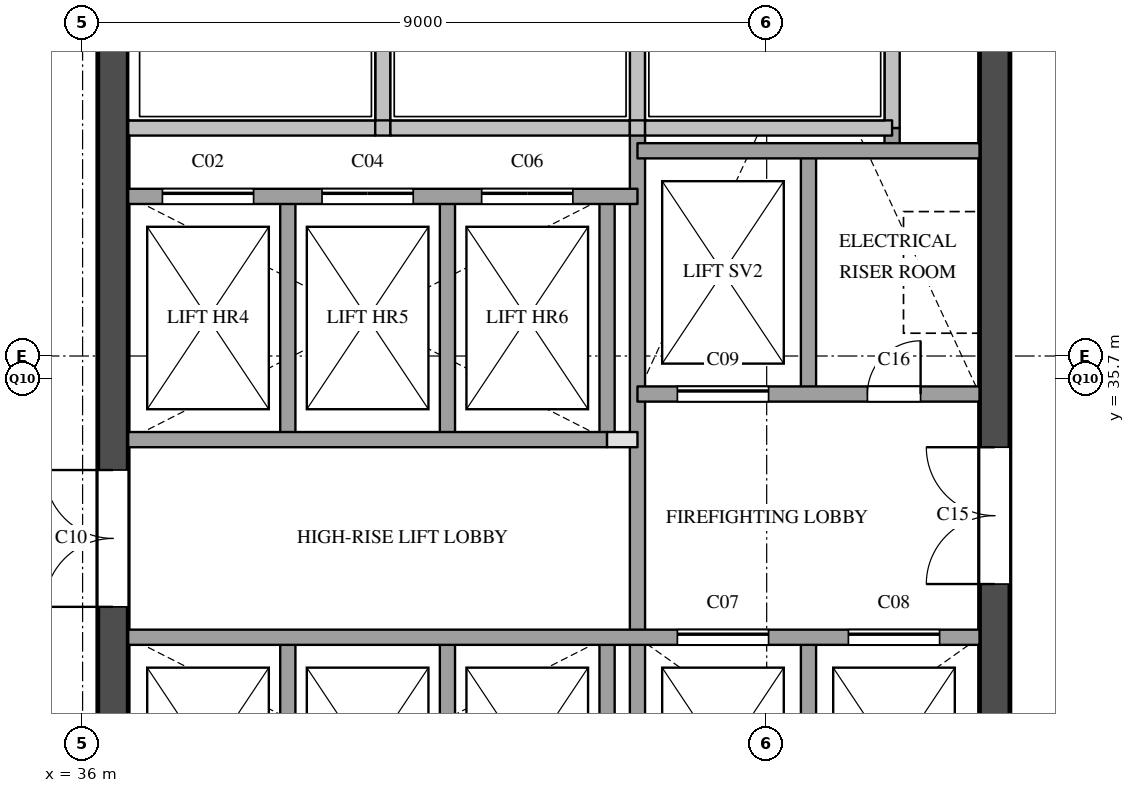
"""IFC4 building model, lengths in metres.
Left out: names, types, materials, properties, quantities, classifications, styles, units other than length and angle.
Written with IfcOpenShell. Run it as: python <this file> out.ifc"""

import sys

from ifc_helpers import new_model, si_unit, direction, frame, frame_2d, origin, place, context, subcontext, project, spatial, rectangle, extrude, element, fill, save


model = new_model("IFC4")
c1 = context("Model", 3, precision=1e-05, world=origin(), true_north=direction((0.0, 1.0)))
c2 = subcontext(c1, "Body", "Model", "MODEL_VIEW")
j1 = project(units=[si_unit("LENGTHUNIT", "METRE"), si_unit("PLANEANGLEUNIT", "RADIAN")], contexts=[c1])
p1 = place(None, origin())
s1 = spatial("IfcSite", under=j1, at=p1, CompositionType="ELEMENT")
p2 = place(p1, origin())
s2 = spatial("IfcBuilding", under=s1, at=p2, CompositionType="ELEMENT")
p3 = place(p2, frame((0.0, 0.0, 218.9)))
s3 = spatial("IfcBuildingStorey", under=s2, at=p3, CompositionType="ELEMENT", Elevation=218.9)
p4 = place(p3, frame((36.4, 29.1, 0.0), z_axis=(0.0, 0.0, 1.0), x_axis=(0.0, 1.0, 0.0)))
e1 = element("IfcWall", 1, at=p4, inside=s3, PredefinedType="SHEAR", context=c2, shape_type="SweptSolid", body=[
    extrude(rectangle(XDim=20.3, YDim=0.4, at=frame_2d((10.15, 0.0))), origin(), (0.0, 0.0, 1.0), 3.6),
])
p5 = place(p4, frame((3.6, 0.0, 0.0)))
e2 = element("IfcOpeningElement", 2, at=p5, cuts=e1, PredefinedType="OPENING", context=c2, shape_type="SweptSolid", body=[
    extrude(rectangle(XDim=1.8, YDim=2.1, at=frame_2d((0.9, 1.05))), frame((0.0, 0.21, 0.0), z_axis=(0.0, -1.0, 0.0), x_axis=(1.0, 0.0, 0.0)), (0.0, 0.0, 1.0), 0.42),
])
p6 = place(p4, frame((16.4, 0.0, 0.0)))
e3 = element("IfcOpeningElement", 3, at=p6, cuts=e1, PredefinedType="OPENING", context=c2, shape_type="SweptSolid", body=[
    extrude(rectangle(XDim=1.0, YDim=2.1, at=frame_2d((0.5, 1.05))), frame((0.0, 0.21, 0.0), z_axis=(0.0, -1.0, 0.0), x_axis=(1.0, 0.0, 0.0)), (0.0, 0.0, 1.0), 0.42),
])
p7 = place(p3, frame((48.0, 29.1, 0.0), z_axis=(0.0, 0.0, 1.0), x_axis=(0.0, 1.0, 0.0)))
e4 = element("IfcWall", 4, at=p7, inside=s3, PredefinedType="SHEAR", context=c2, shape_type="SweptSolid", body=[
    extrude(rectangle(XDim=20.3, YDim=0.4, at=frame_2d((10.15, 0.0))), origin(), (0.0, 0.0, 1.0), 3.6),
])
p8 = place(p7, frame((12.5, 0.0, 0.0)))
e5 = element("IfcOpeningElement", 5, at=p8, cuts=e4, PredefinedType="OPENING", context=c2, shape_type="SweptSolid", body=[
    extrude(rectangle(XDim=0.7, YDim=2.1, at=frame_2d((0.35, 1.05))), frame((0.0, 0.21, 0.0), z_axis=(0.0, -1.0, 0.0), x_axis=(1.0, 0.0, 0.0)), (0.0, 0.0, 1.0), 0.42),
])
p9 = place(p7, frame((3.9, 0.0, 0.0)))
e6 = element("IfcOpeningElement", 6, at=p9, cuts=e4, PredefinedType="OPENING", context=c2, shape_type="SweptSolid", body=[
    extrude(rectangle(XDim=1.8, YDim=2.1, at=frame_2d((0.9, 1.05))), frame((0.0, 0.21, 0.0), z_axis=(0.0, -1.0, 0.0), x_axis=(1.0, 0.0, 0.0)), (0.0, 0.0, 1.0), 0.42),
])
p10 = place(p3, frame((38.7, 29.1, 0.0), z_axis=(0.0, 0.0, 1.0), x_axis=(0.0, 1.0, 0.0)))
e7 = element("IfcWall", 7, at=p10, inside=s3, PredefinedType="SOLIDWALL", context=c2, shape_type="SweptSolid", body=[
    extrude(rectangle(XDim=3.2, YDim=0.2, at=frame_2d((1.6, 0.0))), origin(), (0.0, 0.0, 1.0), 3.6),
])
p11 = place(p3, frame((38.7, 34.9, 0.0), z_axis=(0.0, 0.0, 1.0), x_axis=(0.0, 1.0, 0.0)))
e8 = element("IfcWall", 8, at=p11, inside=s3, PredefinedType="SOLIDWALL", context=c2, shape_type="SweptSolid", body=[
    extrude(rectangle(XDim=3.2, YDim=0.2, at=frame_2d((1.6, 0.0))), origin(), (0.0, 0.0, 1.0), 3.6),
])
p12 = place(p3, frame((39.95, 39.0, 0.0), z_axis=(0.0, 0.0, 1.0), x_axis=(0.0, 1.0, 0.0)))
e9 = element("IfcWall", 9, at=p12, inside=s3, PredefinedType="SOLIDWALL", context=c2, shape_type="SweptSolid", body=[
    extrude(rectangle(XDim=1.78, YDim=0.2, at=frame_2d((0.89, 0.0))), origin(), (0.0, 0.0, 1.0), 3.6),
])
p13 = place(p3, frame((40.8, 29.1, 0.0), z_axis=(0.0, 0.0, 1.0), x_axis=(0.0, 1.0, 0.0)))
e10 = element("IfcWall", 10, at=p13, inside=s3, PredefinedType="SOLIDWALL", context=c2, shape_type="SweptSolid", body=[
    extrude(rectangle(XDim=3.2, YDim=0.2, at=frame_2d((1.6, 0.0))), origin(), (0.0, 0.0, 1.0), 3.6),
])
p14 = place(p3, frame((40.8, 34.9, 0.0), z_axis=(0.0, 0.0, 1.0), x_axis=(0.0, 1.0, 0.0)))
e11 = element("IfcWall", 11, at=p14, inside=s3, PredefinedType="SOLIDWALL", context=c2, shape_type="SweptSolid", body=[
    extrude(rectangle(XDim=3.2, YDim=0.2, at=frame_2d((1.6, 0.0))), origin(), (0.0, 0.0, 1.0), 3.6),
])
p15 = place(p3, frame((42.9, 29.1, 0.0), z_axis=(0.0, 0.0, 1.0), x_axis=(0.0, 1.0, 0.0)))
e12 = element("IfcWall", 12, at=p15, inside=s3, PredefinedType="SOLIDWALL", context=c2, shape_type="SweptSolid", body=[
    extrude(rectangle(XDim=3.2, YDim=0.2, at=frame_2d((1.6, 0.0))), origin(), (0.0, 0.0, 1.0), 3.6),
])
p16 = place(p3, frame((42.9, 34.9, 0.0), z_axis=(0.0, 0.0, 1.0), x_axis=(0.0, 1.0, 0.0)))
e13 = element("IfcWall", 13, at=p16, inside=s3, PredefinedType="SOLIDWALL", context=c2, shape_type="SweptSolid", body=[
    extrude(rectangle(XDim=3.2, YDim=0.2, at=frame_2d((1.6, 0.0))), origin(), (0.0, 0.0, 1.0), 3.6),
])
p17 = place(p3, frame((43.3, 29.1, 0.0), z_axis=(0.0, 0.0, 1.0), x_axis=(0.0, 1.0, 0.0)))
e14 = element("IfcWall", 14, at=p17, inside=s3, PredefinedType="SOLIDWALL", context=c2, shape_type="SweptSolid", body=[
    extrude(rectangle(XDim=9.9, YDim=0.2, at=frame_2d((4.95, 0.0))), origin(), (0.0, 0.0, 1.0), 3.6),
])
p18 = place(p3, frame((43.3, 39.0, 0.0), z_axis=(0.0, 0.0, 1.0), x_axis=(0.0, 1.0, 0.0)))
e15 = element("IfcWall", 15, at=p18, inside=s3, PredefinedType="SOLIDWALL", context=c2, shape_type="SweptSolid", body=[
    extrude(rectangle(XDim=1.78, YDim=0.2, at=frame_2d((0.89, 0.0))), origin(), (0.0, 0.0, 1.0), 3.6),
])
for number, where, z_axis, x_axis in (
    (16, (45.55, 29.1, 0.0), (0.0, 0.0, 1.0), (0.0, 1.0, 0.0)),
    (17, (45.55, 35.5, 0.0), (0.0, 0.0, 1.0), (0.0, 1.0, 0.0)),
):
    element("IfcWall", number, at=place(p3, frame(where, z_axis=z_axis, x_axis=x_axis)), inside=s3, PredefinedType="SOLIDWALL", context=c2, shape_type="SweptSolid", body=[
        extrude(rectangle(XDim=3.2, YDim=0.2, at=frame_2d((1.6, 0.0))), origin(), (0.0, 0.0, 1.0), 3.6),
    ])
p19 = place(p3, frame((46.65, 38.7, 0.0), z_axis=(0.0, 0.0, 1.0), x_axis=(0.0, 1.0, 0.0)))
e18 = element("IfcWall", 18, at=p19, inside=s3, PredefinedType="SOLIDWALL", context=c2, shape_type="SweptSolid", body=[
    extrude(rectangle(XDim=0.3, YDim=0.2, at=frame_2d((0.15, 0.0))), origin(), (0.0, 0.0, 1.0), 3.6),
])
p20 = place(p3, frame((46.65, 39.0, 0.0), z_axis=(0.0, 0.0, 1.0), x_axis=(0.0, 1.0, 0.0)))
e19 = element("IfcWall", 19, at=p20, inside=s3, PredefinedType="SOLIDWALL", context=c2, shape_type="SweptSolid", body=[
    extrude(rectangle(XDim=1.78, YDim=0.2, at=frame_2d((0.89, 0.0))), origin(), (0.0, 0.0, 1.0), 3.6),
])
p21 = place(p3, frame((36.6, 32.3, 0.0), z_axis=(0.0, 0.0, 1.0), x_axis=(1.0, 0.0, 0.0)))
e20 = element("IfcWall", 20, at=p21, inside=s3, PredefinedType="SOLIDWALL", context=c2, shape_type="SweptSolid", body=[
    extrude(rectangle(XDim=11.2, YDim=0.2, at=frame_2d((5.6, 0.0))), origin(), (0.0, 0.0, 1.0), 3.6),
])
p22 = place(p21, frame((7.225, 0.0, 0.0)))
e21 = element("IfcOpeningElement", 21, at=p22, cuts=e20, PredefinedType="OPENING", context=c2, shape_type="SweptSolid", body=[
    extrude(rectangle(XDim=1.2, YDim=2.1, at=frame_2d((0.6, 1.05))), frame((0.0, 0.11, 0.0), z_axis=(0.0, -1.0, 0.0), x_axis=(1.0, 0.0, 0.0)), (0.0, 0.0, 1.0), 0.22),
])
p23 = place(p21, frame((9.475, 0.0, 0.0)))
e22 = element("IfcOpeningElement", 22, at=p23, cuts=e20, PredefinedType="OPENING", context=c2, shape_type="SweptSolid", body=[
    extrude(rectangle(XDim=1.2, YDim=2.1, at=frame_2d((0.6, 1.05))), frame((0.0, 0.11, 0.0), z_axis=(0.0, -1.0, 0.0), x_axis=(1.0, 0.0, 0.0)), (0.0, 0.0, 1.0), 0.22),
])
p24 = place(p3, frame((42.9, 34.9, 0.0), z_axis=(0.0, 0.0, 1.0), x_axis=(1.0, 0.0, 0.0)))
e23 = element("IfcWall", 23, at=p24, inside=s3, PredefinedType="PARTITIONING", context=c2, shape_type="SweptSolid", body=[
    extrude(rectangle(XDim=0.4, YDim=0.2, at=frame_2d((0.2, 0.0))), origin(), (0.0, 0.0, 1.0), 3.6),
])
p25 = place(p3, frame((36.6, 34.9, 0.0), z_axis=(0.0, 0.0, 1.0), x_axis=(1.0, 0.0, 0.0)))
e24 = element("IfcWall", 24, at=p25, inside=s3, PredefinedType="SOLIDWALL", context=c2, shape_type="SweptSolid", body=[
    extrude(rectangle(XDim=6.3, YDim=0.2, at=frame_2d((3.15, 0.0))), origin(), (0.0, 0.0, 1.0), 3.6),
])
p26 = place(p3, frame((43.3, 35.5, 0.0), z_axis=(0.0, 0.0, 1.0), x_axis=(1.0, 0.0, 0.0)))
e25 = element("IfcWall", 25, at=p26, inside=s3, PredefinedType="SOLIDWALL", context=c2, shape_type="SweptSolid", body=[
    extrude(rectangle(XDim=4.5, YDim=0.2, at=frame_2d((2.25, 0.0))), origin(), (0.0, 0.0, 1.0), 3.6),
])
p27 = place(p26, frame((0.525, 0.0, 0.0)))
e26 = element("IfcOpeningElement", 26, at=p27, cuts=e25, PredefinedType="OPENING", context=c2, shape_type="SweptSolid", body=[
    extrude(rectangle(XDim=1.2, YDim=2.1, at=frame_2d((0.6, 1.05))), frame((0.0, 0.11, 0.0), z_axis=(0.0, -1.0, 0.0), x_axis=(1.0, 0.0, 0.0)), (0.0, 0.0, 1.0), 0.22),
])
p28 = place(p26, frame((3.025, 0.0, 0.0)))
e27 = element("IfcOpeningElement", 27, at=p28, cuts=e25, PredefinedType="OPENING", context=c2, shape_type="SweptSolid", body=[
    extrude(rectangle(XDim=0.7, YDim=2.1, at=frame_2d((0.35, 1.05))), frame((0.0, 0.11, 0.0), z_axis=(0.0, -1.0, 0.0), x_axis=(1.0, 0.0, 0.0)), (0.0, 0.0, 1.0), 0.22),
])
p29 = place(p3, frame((36.6, 38.1, 0.0), z_axis=(0.0, 0.0, 1.0), x_axis=(1.0, 0.0, 0.0)))
e28 = element("IfcWall", 28, at=p29, inside=s3, PredefinedType="SOLIDWALL", context=c2, shape_type="SweptSolid", body=[
    extrude(rectangle(XDim=6.7, YDim=0.2, at=frame_2d((3.35, 0.0))), origin(), (0.0, 0.0, 1.0), 3.6),
])
p30 = place(p29, frame((0.45, 0.0, 0.0)))
e29 = element("IfcOpeningElement", 29, at=p30, cuts=e28, PredefinedType="OPENING", context=c2, shape_type="SweptSolid", body=[
    extrude(rectangle(XDim=1.2, YDim=2.1, at=frame_2d((0.6, 1.05))), frame((0.0, 0.11, 0.0), z_axis=(0.0, -1.0, 0.0), x_axis=(1.0, 0.0, 0.0)), (0.0, 0.0, 1.0), 0.22),
])
p31 = place(p29, frame((2.55, 0.0, 0.0)))
e30 = element("IfcOpeningElement", 30, at=p31, cuts=e28, PredefinedType="OPENING", context=c2, shape_type="SweptSolid", body=[
    extrude(rectangle(XDim=1.2, YDim=2.1, at=frame_2d((0.6, 1.05))), frame((0.0, 0.11, 0.0), z_axis=(0.0, -1.0, 0.0), x_axis=(1.0, 0.0, 0.0)), (0.0, 0.0, 1.0), 0.22),
])
p32 = place(p29, frame((4.65, 0.0, 0.0)))
e31 = element("IfcOpeningElement", 31, at=p32, cuts=e28, PredefinedType="OPENING", context=c2, shape_type="SweptSolid", body=[
    extrude(rectangle(XDim=1.2, YDim=2.1, at=frame_2d((0.6, 1.05))), frame((0.0, 0.11, 0.0), z_axis=(0.0, -1.0, 0.0), x_axis=(1.0, 0.0, 0.0)), (0.0, 0.0, 1.0), 0.22),
])
p33 = place(p3, frame((43.3, 38.7, 0.0), z_axis=(0.0, 0.0, 1.0), x_axis=(1.0, 0.0, 0.0)))
e32 = element("IfcWall", 32, at=p33, inside=s3, PredefinedType="SOLIDWALL", context=c2, shape_type="SweptSolid", body=[
    extrude(rectangle(XDim=4.5, YDim=0.2, at=frame_2d((2.25, 0.0))), origin(), (0.0, 0.0, 1.0), 3.6),
])
p34 = place(p3, frame((36.6, 39.0, 0.0), z_axis=(0.0, 0.0, 1.0), x_axis=(1.0, 0.0, 0.0)))
e33 = element("IfcWall", 33, at=p34, inside=s3, PredefinedType="SOLIDWALL", context=c2, shape_type="SweptSolid", body=[
    extrude(rectangle(XDim=3.25, YDim=0.2, at=frame_2d((1.625, 0.0))), origin(), (0.0, 0.0, 1.0), 3.6),
])
p35 = place(p3, frame((39.85, 39.0, 0.0), z_axis=(0.0, 0.0, 1.0), x_axis=(1.0, 0.0, 0.0)))
e34 = element("IfcWall", 34, at=p35, inside=s3, PredefinedType="SOLIDWALL", context=c2, shape_type="SweptSolid", body=[
    extrude(rectangle(XDim=0.2, YDim=0.2, at=frame_2d((0.1, 0.0))), origin(), (0.0, 0.0, 1.0), 3.6),
])
p36 = place(p3, frame((40.05, 39.0, 0.0), z_axis=(0.0, 0.0, 1.0), x_axis=(1.0, 0.0, 0.0)))
e35 = element("IfcWall", 35, at=p36, inside=s3, PredefinedType="SOLIDWALL", context=c2, shape_type="SweptSolid", body=[
    extrude(rectangle(XDim=3.15, YDim=0.2, at=frame_2d((1.575, 0.0))), origin(), (0.0, 0.0, 1.0), 3.6),
])
p37 = place(p3, frame((43.2, 39.0, 0.0), z_axis=(0.0, 0.0, 1.0), x_axis=(1.0, 0.0, 0.0)))
e36 = element("IfcWall", 36, at=p37, inside=s3, PredefinedType="SOLIDWALL", context=c2, shape_type="SweptSolid", body=[
    extrude(rectangle(XDim=0.2, YDim=0.2, at=frame_2d((0.1, 0.0))), origin(), (0.0, 0.0, 1.0), 3.6),
])
p38 = place(p3, frame((43.4, 39.0, 0.0), z_axis=(0.0, 0.0, 1.0), x_axis=(1.0, 0.0, 0.0)))
e37 = element("IfcWall", 37, at=p38, inside=s3, PredefinedType="SOLIDWALL", context=c2, shape_type="SweptSolid", body=[
    extrude(rectangle(XDim=3.25, YDim=0.2, at=frame_2d((1.625, 0.0))), origin(), (0.0, 0.0, 1.0), 3.6),
])
p39 = place(p30, origin())
e38 = element("IfcDoor", 38, at=p39, inside=s3, OperationType="SLIDING_TO_LEFT", PredefinedType="DOOR", context=c2, shape_type="SweptSolid", body=[
    extrude(rectangle(XDim=1.2, YDim=2.1, at=frame_2d((0.6, 1.05))), frame((0.0, 0.025, 0.0), z_axis=(0.0, -1.0, 0.0), x_axis=(1.0, 0.0, 0.0)), (0.0, 0.0, 1.0), 0.05),
])
fill(e29, e38)
p40 = place(p31, origin())
e39 = element("IfcDoor", 39, at=p40, inside=s3, OperationType="SLIDING_TO_LEFT", PredefinedType="DOOR", context=c2, shape_type="SweptSolid", body=[
    extrude(rectangle(XDim=1.2, YDim=2.1, at=frame_2d((0.6, 1.05))), frame((0.0, 0.025, 0.0), z_axis=(0.0, -1.0, 0.0), x_axis=(1.0, 0.0, 0.0)), (0.0, 0.0, 1.0), 0.05),
])
fill(e30, e39)
p41 = place(p32, origin())
e40 = element("IfcDoor", 40, at=p41, inside=s3, OperationType="SLIDING_TO_LEFT", PredefinedType="DOOR", context=c2, shape_type="SweptSolid", body=[
    extrude(rectangle(XDim=1.2, YDim=2.1, at=frame_2d((0.6, 1.05))), frame((0.0, 0.025, 0.0), z_axis=(0.0, -1.0, 0.0), x_axis=(1.0, 0.0, 0.0)), (0.0, 0.0, 1.0), 0.05),
])
fill(e31, e40)
p42 = place(p22, origin())
e41 = element("IfcDoor", 41, at=p42, inside=s3, OperationType="SLIDING_TO_LEFT", PredefinedType="DOOR", context=c2, shape_type="SweptSolid", body=[
    extrude(rectangle(XDim=1.2, YDim=2.1, at=frame_2d((0.6, 1.05))), frame((0.0, 0.025, 0.0), z_axis=(0.0, -1.0, 0.0), x_axis=(1.0, 0.0, 0.0)), (0.0, 0.0, 1.0), 0.05),
])
fill(e21, e41)
p43 = place(p23, origin())
e42 = element("IfcDoor", 42, at=p43, inside=s3, OperationType="SLIDING_TO_LEFT", PredefinedType="DOOR", context=c2, shape_type="SweptSolid", body=[
    extrude(rectangle(XDim=1.2, YDim=2.1, at=frame_2d((0.6, 1.05))), frame((0.0, 0.025, 0.0), z_axis=(0.0, -1.0, 0.0), x_axis=(1.0, 0.0, 0.0)), (0.0, 0.0, 1.0), 0.05),
])
fill(e22, e42)
p44 = place(p27, origin())
e43 = element("IfcDoor", 43, at=p44, inside=s3, OperationType="SLIDING_TO_LEFT", PredefinedType="DOOR", context=c2, shape_type="SweptSolid", body=[
    extrude(rectangle(XDim=1.2, YDim=2.1, at=frame_2d((0.6, 1.05))), frame((0.0, 0.025, 0.0), z_axis=(0.0, -1.0, 0.0), x_axis=(1.0, 0.0, 0.0)), (0.0, 0.0, 1.0), 0.05),
])
fill(e26, e43)
p45 = place(p5, origin())
e44 = element("IfcDoor", 44, at=p45, inside=s3, OperationType="DOUBLE_DOOR_SINGLE_SWING", PredefinedType="DOOR", context=c2, shape_type="SweptSolid", body=[
    extrude(rectangle(XDim=1.8, YDim=2.1, at=frame_2d((0.9, 1.05))), frame((0.0, 0.025, 0.0), z_axis=(0.0, -1.0, 0.0), x_axis=(1.0, 0.0, 0.0)), (0.0, 0.0, 1.0), 0.05),
])
fill(e2, e44)
p46 = place(p9, origin())
e45 = element("IfcDoor", 45, at=p46, inside=s3, OperationType="DOUBLE_DOOR_SINGLE_SWING", PredefinedType="DOOR", context=c2, shape_type="SweptSolid", body=[
    extrude(rectangle(XDim=1.8, YDim=2.1, at=frame_2d((0.9, 1.05))), frame((0.0, 0.025, 0.0), z_axis=(0.0, -1.0, 0.0), x_axis=(1.0, 0.0, 0.0)), (0.0, 0.0, 1.0), 0.05),
])
fill(e6, e45)
p47 = place(p28, origin())
e46 = element("IfcDoor", 46, at=p47, inside=s3, OperationType="SINGLE_SWING_RIGHT", PredefinedType="DOOR", context=c2, shape_type="SweptSolid", body=[
    extrude(rectangle(XDim=0.7, YDim=2.1, at=frame_2d((0.35, 1.05))), frame((0.0, 0.025, 0.0), z_axis=(0.0, -1.0, 0.0), x_axis=(1.0, 0.0, 0.0)), (0.0, 0.0, 1.0), 0.05),
])
fill(e27, e46)
save(model, sys.argv[1])
